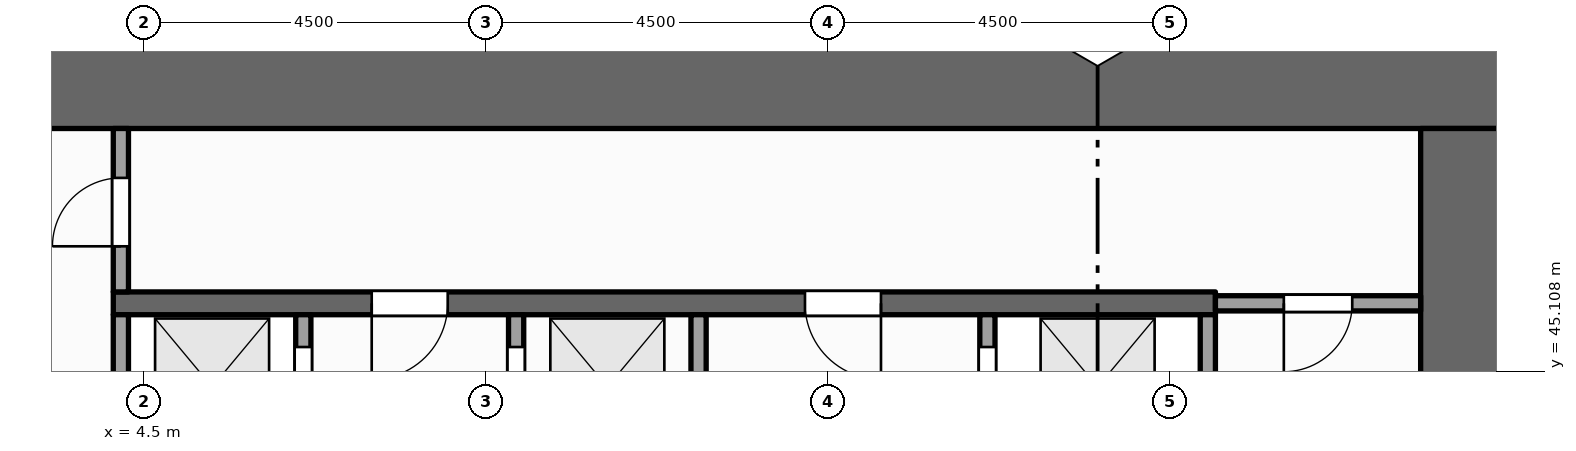
"""IFC4 building model, lengths in metres.
Left out: names, types, materials, properties, quantities, classifications, styles, units other than length and angle.
Written with IfcOpenShell. Run it as: python <this file> out.ifc"""

import sys

from ifc_helpers import new_model, si_unit, direction, frame, frame_2d, origin, place, context, subcontext, project, spatial, rectangle, extrude, element, fill, save


model = new_model("IFC4")
c1 = context("Model", 3, precision=1e-05, world=origin(), true_north=direction((0.0, 1.0)))
c2 = subcontext(c1, "Body", "Model", "MODEL_VIEW")
j1 = project(units=[si_unit("LENGTHUNIT", "METRE"), si_unit("PLANEANGLEUNIT", "RADIAN")], contexts=[c1])
p1 = place(None, origin())
s1 = spatial("IfcSite", under=j1, at=p1, CompositionType="ELEMENT")
p2 = place(p1, origin())
s2 = spatial("IfcBuilding", under=s1, at=p2, CompositionType="ELEMENT")
p3 = place(p2, frame((0.0, 0.0, 131.0)))
s3 = spatial("IfcBuildingStorey", under=s2, at=p3, CompositionType="ELEMENT", Elevation=131.0)
p4 = place(p3, frame((0.0, 48.9, -0.15), z_axis=(0.0, 0.0, 1.0), x_axis=(1.0, 0.0, 0.0)))
e1 = element("IfcWall", 1, at=p4, inside=s3, PredefinedType="SHEAR", context=c2, shape_type="SweptSolid", body=[
    extrude(rectangle(XDim=22.5, YDim=1.2, at=frame_2d((11.25, 0.0))), origin(), (0.0, 0.0, 1.0), 8.0),
])
p5 = place(p3, frame((21.9, 37.2, -0.15), z_axis=(0.0, 0.0, 1.0), x_axis=(0.0, 1.0, 0.0)))
e2 = element("IfcWall", 2, at=p5, inside=s3, PredefinedType="SHEAR", context=c2, shape_type="SweptSolid", body=[
    extrude(rectangle(XDim=11.1, YDim=1.2, at=frame_2d((5.55, 0.0))), origin(), (0.0, 0.0, 1.0), 8.0),
])
p6 = place(p3, frame((4.2, 43.525, 0.0), z_axis=(0.0, 0.0, 1.0), x_axis=(0.0, 1.0, 0.0)))
e3 = element("IfcWall", 3, at=p6, inside=s3, PredefinedType="SOLIDWALL", context=c2, shape_type="SweptSolid", body=[
    extrude(rectangle(XDim=2.325, YDim=0.2, at=frame_2d((1.163, 0.0))), origin(), (0.0, 0.0, 1.0), 7.85),
])
p7 = place(p3, frame((4.2, 46.15, 0.0), z_axis=(0.0, 0.0, 1.0), x_axis=(0.0, 1.0, 0.0)))
e4 = element("IfcWall", 4, at=p7, inside=s3, PredefinedType="PARTITIONING", context=c2, shape_type="SweptSolid", body=[
    extrude(rectangle(XDim=2.15, YDim=0.2, at=frame_2d((1.075, 0.0))), origin(), (0.0, 0.0, 1.0), 7.85),
])
p8 = place(p7, frame((0.6, 0.0, 0.0)))
e5 = element("IfcOpeningElement", 5, at=p8, cuts=e4, PredefinedType="OPENING", context=c2, shape_type="SweptSolid", body=[
    extrude(rectangle(XDim=0.9, YDim=2.1, at=frame_2d((0.45, 1.05))), frame((0.0, 0.11, 0.0), z_axis=(0.0, -1.0, 0.0), x_axis=(1.0, 0.0, 0.0)), (0.0, 0.0, 1.0), 0.22),
])
p9 = place(p3, frame((6.6, 37.2, 0.0), z_axis=(0.0, 0.0, 1.0), x_axis=(0.0, 1.0, 0.0)))
e6 = element("IfcWall", 6, at=p9, inside=s3, PredefinedType="SOLIDWALL", context=c2, shape_type="SweptSolid", body=[
    extrude(rectangle(XDim=8.65, YDim=0.2, at=frame_2d((4.325, 0.0))), origin(), (0.0, 0.0, 1.0), 7.85),
])
p10 = place(p9, frame((0.5, 0.0, 0.012)))
e7 = element("IfcOpeningElement", 7, at=p10, cuts=e6, PredefinedType="OPENING", context=c2, shape_type="SweptSolid", body=[
    extrude(rectangle(XDim=1.1, YDim=2.1, at=frame_2d((0.55, 1.05))), frame((0.0, 0.11, 0.0), z_axis=(0.0, -1.0, 0.0), x_axis=(1.0, 0.0, 0.0)), (0.0, 0.0, 1.0), 0.22),
])
p11 = place(p9, frame((2.75, 0.0, 0.012)))
e8 = element("IfcOpeningElement", 8, at=p11, cuts=e6, PredefinedType="OPENING", context=c2, shape_type="SweptSolid", body=[
    extrude(rectangle(XDim=1.1, YDim=2.1, at=frame_2d((0.55, 1.05))), frame((0.0, 0.11, 0.0), z_axis=(0.0, -1.0, 0.0), x_axis=(1.0, 0.0, 0.0)), (0.0, 0.0, 1.0), 0.22),
])
p12 = place(p9, frame((4.95, 0.0, 0.012)))
e9 = element("IfcOpeningElement", 9, at=p12, cuts=e6, PredefinedType="OPENING", context=c2, shape_type="SweptSolid", body=[
    extrude(rectangle(XDim=1.1, YDim=2.1, at=frame_2d((0.55, 1.05))), frame((0.0, 0.11, 0.0), z_axis=(0.0, -1.0, 0.0), x_axis=(1.0, 0.0, 0.0)), (0.0, 0.0, 1.0), 0.22),
])
p13 = place(p9, frame((7.125, 0.0, 0.012)))
e10 = element("IfcOpeningElement", 10, at=p13, cuts=e6, PredefinedType="OPENING", context=c2, shape_type="SweptSolid", body=[
    extrude(rectangle(XDim=1.1, YDim=2.1, at=frame_2d((0.55, 1.05))), frame((0.0, 0.11, 0.0), z_axis=(0.0, -1.0, 0.0), x_axis=(1.0, 0.0, 0.0)), (0.0, 0.0, 1.0), 0.22),
])
p14 = place(p3, frame((9.4, 37.2, 0.0), z_axis=(0.0, 0.0, 1.0), x_axis=(0.0, 1.0, 0.0)))
e11 = element("IfcWall", 11, at=p14, inside=s3, PredefinedType="SOLIDWALL", context=c2, shape_type="SweptSolid", body=[
    extrude(rectangle(XDim=8.65, YDim=0.2, at=frame_2d((4.325, 0.0))), origin(), (0.0, 0.0, 1.0), 7.85),
])
p15 = place(p14, frame((0.5, 0.0, 0.012)))
e12 = element("IfcOpeningElement", 12, at=p15, cuts=e11, PredefinedType="OPENING", context=c2, shape_type="SweptSolid", body=[
    extrude(rectangle(XDim=1.1, YDim=2.1, at=frame_2d((0.55, 1.05))), frame((0.0, 0.11, 0.0), z_axis=(0.0, -1.0, 0.0), x_axis=(1.0, 0.0, 0.0)), (0.0, 0.0, 1.0), 0.22),
])
p16 = place(p14, frame((2.75, 0.0, 0.012)))
e13 = element("IfcOpeningElement", 13, at=p16, cuts=e11, PredefinedType="OPENING", context=c2, shape_type="SweptSolid", body=[
    extrude(rectangle(XDim=1.1, YDim=2.1, at=frame_2d((0.55, 1.05))), frame((0.0, 0.11, 0.0), z_axis=(0.0, -1.0, 0.0), x_axis=(1.0, 0.0, 0.0)), (0.0, 0.0, 1.0), 0.22),
])
p17 = place(p14, frame((4.95, 0.0, 0.012)))
e14 = element("IfcOpeningElement", 14, at=p17, cuts=e11, PredefinedType="OPENING", context=c2, shape_type="SweptSolid", body=[
    extrude(rectangle(XDim=1.1, YDim=2.1, at=frame_2d((0.55, 1.05))), frame((0.0, 0.11, 0.0), z_axis=(0.0, -1.0, 0.0), x_axis=(1.0, 0.0, 0.0)), (0.0, 0.0, 1.0), 0.22),
])
p18 = place(p14, frame((7.125, 0.0, 0.012)))
e15 = element("IfcOpeningElement", 15, at=p18, cuts=e11, PredefinedType="OPENING", context=c2, shape_type="SweptSolid", body=[
    extrude(rectangle(XDim=1.1, YDim=2.1, at=frame_2d((0.55, 1.05))), frame((0.0, 0.11, 0.0), z_axis=(0.0, -1.0, 0.0), x_axis=(1.0, 0.0, 0.0)), (0.0, 0.0, 1.0), 0.22),
])
p19 = place(p3, frame((11.8, 37.2, 0.0), z_axis=(0.0, 0.0, 1.0), x_axis=(0.0, 1.0, 0.0)))
e16 = element("IfcWall", 16, at=p19, inside=s3, PredefinedType="SOLIDWALL", context=c2, shape_type="SweptSolid", body=[
    extrude(rectangle(XDim=8.65, YDim=0.2, at=frame_2d((4.325, 0.0))), origin(), (0.0, 0.0, 1.0), 7.85),
])
p20 = place(p3, frame((15.6, 37.2, 0.0), z_axis=(0.0, 0.0, 1.0), x_axis=(0.0, 1.0, 0.0)))
e17 = element("IfcWall", 17, at=p20, inside=s3, PredefinedType="SOLIDWALL", context=c2, shape_type="SweptSolid", body=[
    extrude(rectangle(XDim=8.65, YDim=0.2, at=frame_2d((4.325, 0.0))), origin(), (0.0, 0.0, 1.0), 7.85),
])
p21 = place(p20, frame((0.5, 0.0, 0.012)))
e18 = element("IfcOpeningElement", 18, at=p21, cuts=e17, PredefinedType="OPENING", context=c2, shape_type="SweptSolid", body=[
    extrude(rectangle(XDim=1.1, YDim=2.1, at=frame_2d((0.55, 1.05))), frame((0.0, 0.11, 0.0), z_axis=(0.0, -1.0, 0.0), x_axis=(1.0, 0.0, 0.0)), (0.0, 0.0, 1.0), 0.22),
])
p22 = place(p20, frame((2.75, 0.0, 0.012)))
e19 = element("IfcOpeningElement", 19, at=p22, cuts=e17, PredefinedType="OPENING", context=c2, shape_type="SweptSolid", body=[
    extrude(rectangle(XDim=1.1, YDim=2.1, at=frame_2d((0.55, 1.05))), frame((0.0, 0.11, 0.0), z_axis=(0.0, -1.0, 0.0), x_axis=(1.0, 0.0, 0.0)), (0.0, 0.0, 1.0), 0.22),
])
p23 = place(p20, frame((4.95, 0.0, 0.012)))
e20 = element("IfcOpeningElement", 20, at=p23, cuts=e17, PredefinedType="OPENING", context=c2, shape_type="SweptSolid", body=[
    extrude(rectangle(XDim=1.1, YDim=2.1, at=frame_2d((0.55, 1.05))), frame((0.0, 0.11, 0.0), z_axis=(0.0, -1.0, 0.0), x_axis=(1.0, 0.0, 0.0)), (0.0, 0.0, 1.0), 0.22),
])
p24 = place(p20, frame((7.125, 0.0, 0.012)))
e21 = element("IfcOpeningElement", 21, at=p24, cuts=e17, PredefinedType="OPENING", context=c2, shape_type="SweptSolid", body=[
    extrude(rectangle(XDim=1.1, YDim=2.1, at=frame_2d((0.55, 1.05))), frame((0.0, 0.11, 0.0), z_axis=(0.0, -1.0, 0.0), x_axis=(1.0, 0.0, 0.0)), (0.0, 0.0, 1.0), 0.22),
])
p25 = place(p3, frame((18.5, 43.525, 0.0), z_axis=(0.0, 0.0, 1.0), x_axis=(0.0, 1.0, 0.0)))
e22 = element("IfcWall", 22, at=p25, inside=s3, PredefinedType="SOLIDWALL", context=c2, shape_type="SweptSolid", body=[
    extrude(rectangle(XDim=2.325, YDim=0.2, at=frame_2d((1.163, 0.0))), origin(), (0.0, 0.0, 1.0), 7.85),
])
p26 = place(p3, frame((4.1, 46.0, 0.0), z_axis=(0.0, 0.0, 1.0), x_axis=(1.0, 0.0, 0.0)))
e23 = element("IfcWall", 23, at=p26, inside=s3, PredefinedType="SHEAR", context=c2, shape_type="SweptSolid", body=[
    extrude(rectangle(XDim=14.5, YDim=0.3, at=frame_2d((7.25, 0.0))), origin(), (0.0, 0.0, 1.0), 7.85),
])
p27 = place(p26, frame((3.4, 0.0, 0.0)))
e24 = element("IfcOpeningElement", 24, at=p27, cuts=e23, PredefinedType="OPENING", context=c2, shape_type="SweptSolid", body=[
    extrude(rectangle(XDim=1.0, YDim=2.1, at=frame_2d((0.5, 1.05))), frame((0.0, 0.16, 0.0), z_axis=(0.0, -1.0, 0.0), x_axis=(1.0, 0.0, 0.0)), (0.0, 0.0, 1.0), 0.32),
])
p28 = place(p26, frame((9.1, 0.0, 0.0)))
e25 = element("IfcOpeningElement", 25, at=p28, cuts=e23, PredefinedType="OPENING", context=c2, shape_type="SweptSolid", body=[
    extrude(rectangle(XDim=1.0, YDim=2.1, at=frame_2d((0.5, 1.05))), frame((0.0, 0.16, 0.0), z_axis=(0.0, -1.0, 0.0), x_axis=(1.0, 0.0, 0.0)), (0.0, 0.0, 1.0), 0.32),
])
p29 = place(p3, frame((18.6, 46.0, 0.0), z_axis=(0.0, 0.0, 1.0), x_axis=(1.0, 0.0, 0.0)))
e26 = element("IfcWall", 26, at=p29, inside=s3, PredefinedType="PARTITIONING", context=c2, shape_type="SweptSolid", body=[
    extrude(rectangle(XDim=2.7, YDim=0.2, at=frame_2d((1.35, 0.0))), origin(), (0.0, 0.0, 1.0), 7.85),
])
p30 = place(p29, frame((0.9, 0.0, 0.0)))
e27 = element("IfcOpeningElement", 27, at=p30, cuts=e26, PredefinedType="OPENING", context=c2, shape_type="SweptSolid", body=[
    extrude(rectangle(XDim=0.9, YDim=2.1, at=frame_2d((0.45, 1.05))), frame((0.0, 0.11, 0.0), z_axis=(0.0, -1.0, 0.0), x_axis=(1.0, 0.0, 0.0)), (0.0, 0.0, 1.0), 0.22),
])
p31 = place(p13, origin())
e28 = element("IfcDoor", 28, at=p31, inside=s3, OperationType="SLIDING_TO_LEFT", PredefinedType="DOOR", context=c2, shape_type="SweptSolid", body=[
    extrude(rectangle(XDim=1.1, YDim=2.1, at=frame_2d((0.55, 1.05))), frame((0.0, 0.025, 0.0), z_axis=(0.0, -1.0, 0.0), x_axis=(1.0, 0.0, 0.0)), (0.0, 0.0, 1.0), 0.05),
])
fill(e10, e28)
p32 = place(p18, origin())
e29 = element("IfcDoor", 29, at=p32, inside=s3, OperationType="SLIDING_TO_LEFT", PredefinedType="DOOR", context=c2, shape_type="SweptSolid", body=[
    extrude(rectangle(XDim=1.1, YDim=2.1, at=frame_2d((0.55, 1.05))), frame((0.0, 0.025, 0.0), z_axis=(0.0, -1.0, 0.0), x_axis=(1.0, 0.0, 0.0)), (0.0, 0.0, 1.0), 0.05),
])
fill(e15, e29)
p33 = place(p24, origin())
e30 = element("IfcDoor", 30, at=p33, inside=s3, OperationType="SLIDING_TO_LEFT", PredefinedType="DOOR", context=c2, shape_type="SweptSolid", body=[
    extrude(rectangle(XDim=1.1, YDim=2.1, at=frame_2d((0.55, 1.05))), frame((0.0, 0.025, 0.0), z_axis=(0.0, -1.0, 0.0), x_axis=(1.0, 0.0, 0.0)), (0.0, 0.0, 1.0), 0.05),
])
fill(e21, e30)
p34 = place(p27, origin())
e31 = element("IfcDoor", 31, at=p34, inside=s3, OperationType="SINGLE_SWING_LEFT", PredefinedType="DOOR", context=c2, shape_type="SweptSolid", body=[
    extrude(rectangle(XDim=1.0, YDim=2.1, at=frame_2d((0.5, 1.05))), frame((0.0, 0.025, 0.0), z_axis=(0.0, -1.0, 0.0), x_axis=(1.0, 0.0, 0.0)), (0.0, 0.0, 1.0), 0.05),
])
fill(e24, e31)
p35 = place(p28, origin())
e32 = element("IfcDoor", 32, at=p35, inside=s3, OperationType="SINGLE_SWING_RIGHT", PredefinedType="DOOR", context=c2, shape_type="SweptSolid", body=[
    extrude(rectangle(XDim=1.0, YDim=2.1, at=frame_2d((0.5, 1.05))), frame((0.0, 0.025, 0.0), z_axis=(0.0, -1.0, 0.0), x_axis=(1.0, 0.0, 0.0)), (0.0, 0.0, 1.0), 0.05),
])
fill(e25, e32)
p36 = place(p8, origin())
e33 = element("IfcDoor", 33, at=p36, inside=s3, OperationType="SINGLE_SWING_LEFT", PredefinedType="DOOR", context=c2, shape_type="SweptSolid", body=[
    extrude(rectangle(XDim=0.9, YDim=2.1, at=frame_2d((0.45, 1.05))), frame((0.0, 0.025, 0.0), z_axis=(0.0, -1.0, 0.0), x_axis=(1.0, 0.0, 0.0)), (0.0, 0.0, 1.0), 0.05),
])
fill(e5, e33)
p37 = place(p30, origin())
e34 = element("IfcDoor", 34, at=p37, inside=s3, OperationType="SINGLE_SWING_LEFT", PredefinedType="DOOR", context=c2, shape_type="SweptSolid", body=[
    extrude(rectangle(XDim=0.9, YDim=2.1, at=frame_2d((0.45, 1.05))), frame((0.0, 0.025, 0.0), z_axis=(0.0, -1.0, 0.0), x_axis=(1.0, 0.0, 0.0)), (0.0, 0.0, 1.0), 0.05),
])
fill(e27, e34)
save(model, sys.argv[1])
